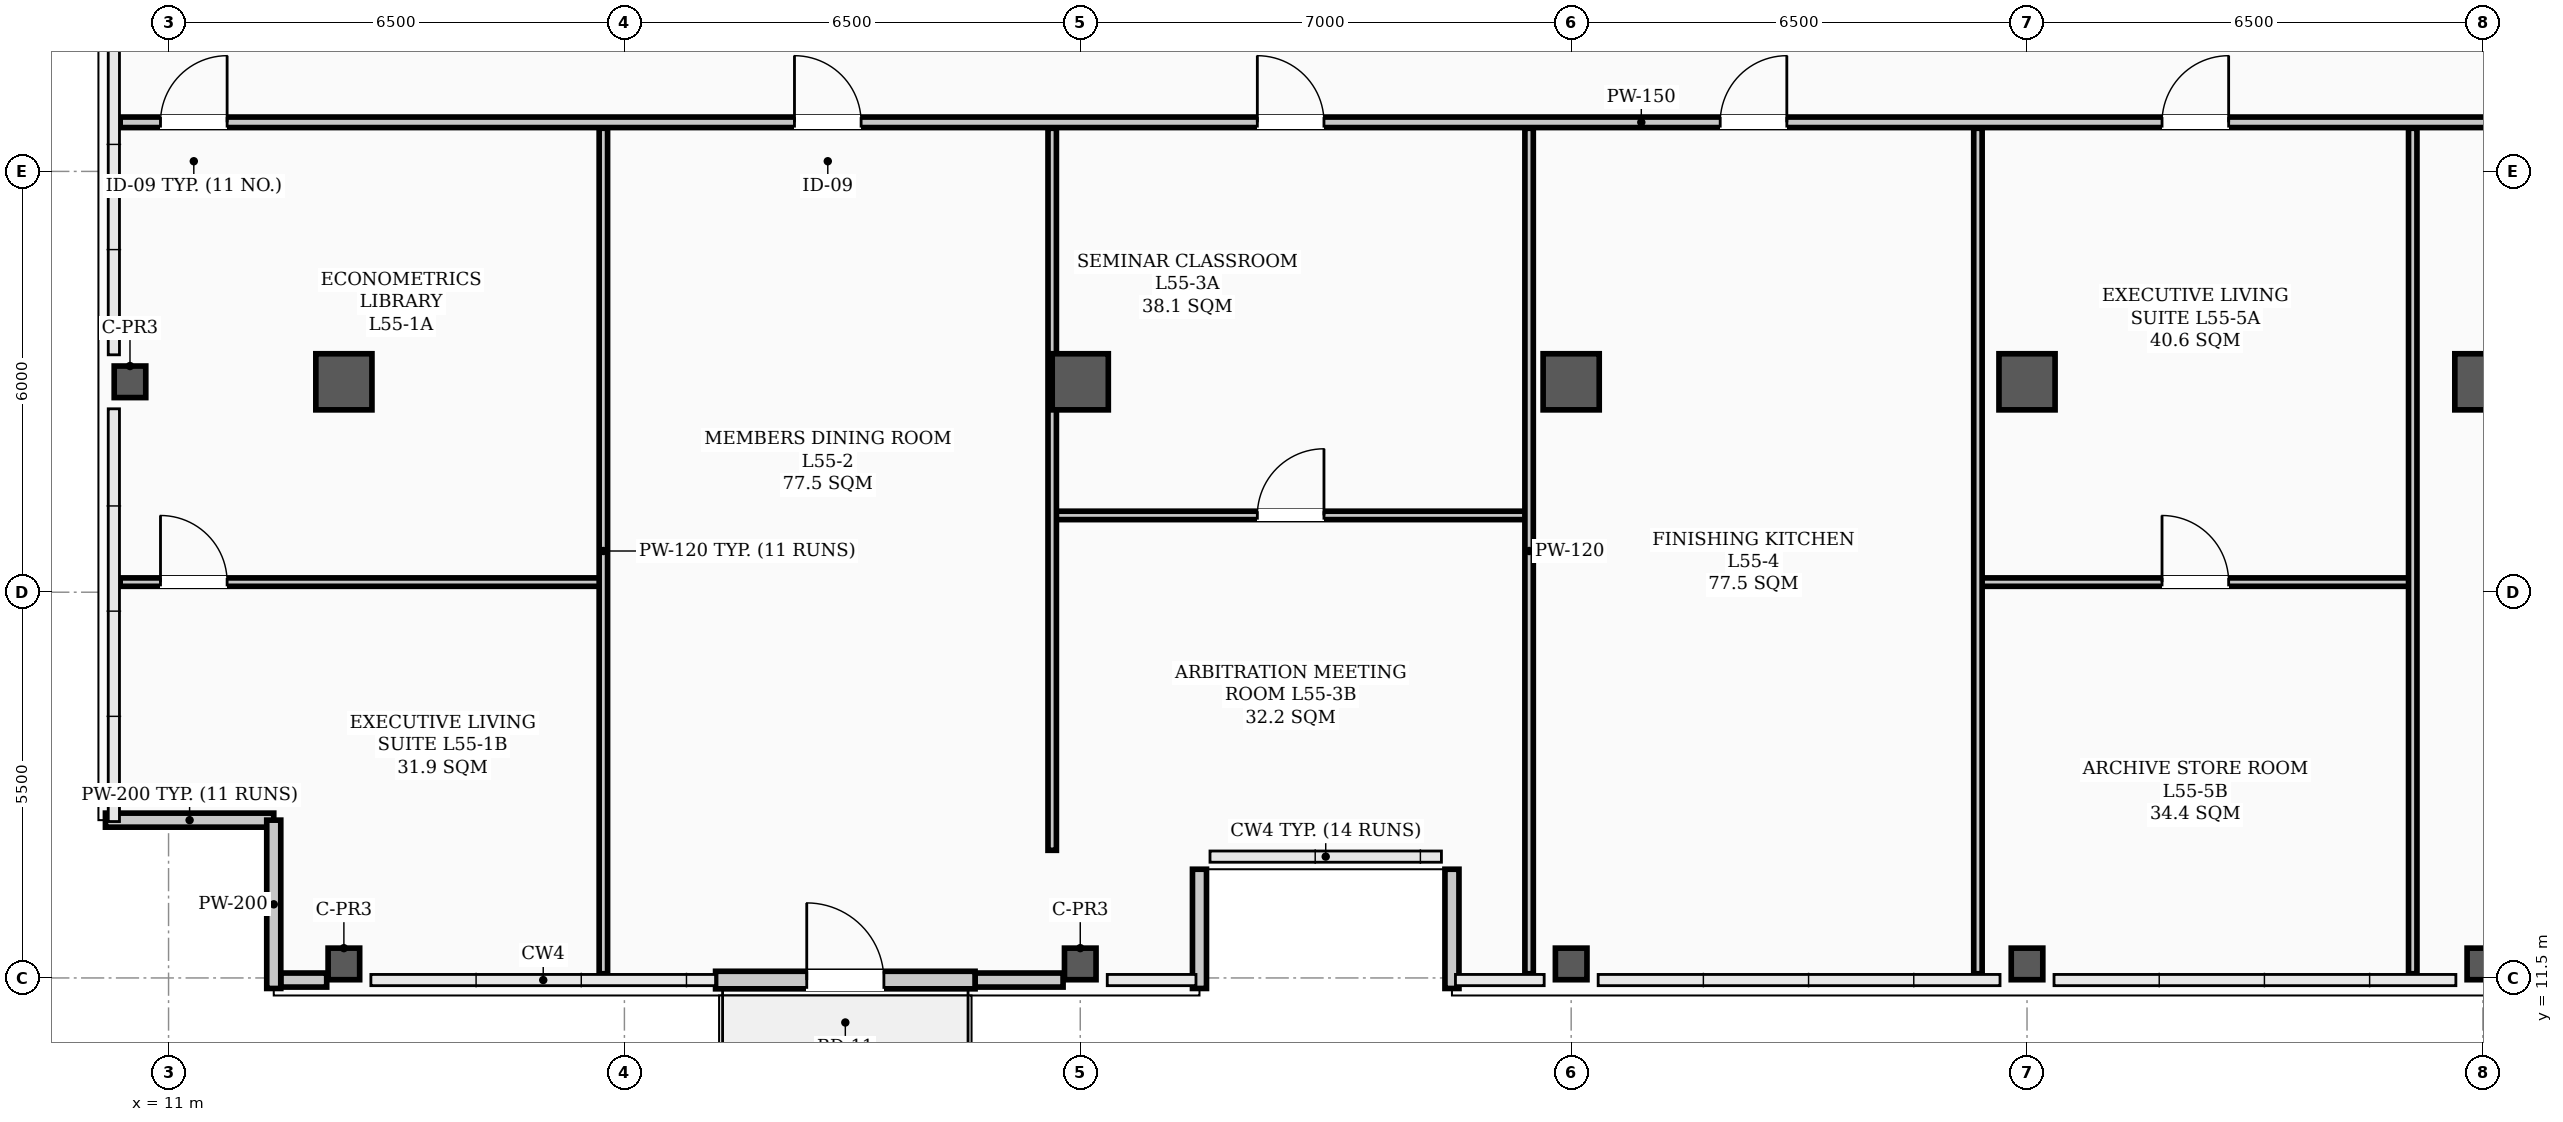
"""IFC4 building model, lengths in metres.
Left out: names, types, materials, properties, quantities, classifications, styles, units other than length and angle.
Written with IfcOpenShell. Run it as: python <this file> out.ifc"""

import sys

from ifc_helpers import new_model, si_unit, direction, frame, frame_2d, origin, origin_2d, place, context, subcontext, project, spatial, rectangle, hollow_rectangle, extrude, element, fill, save


model = new_model("IFC4")
c1 = context("Model", 3, precision=1e-05, world=origin(), true_north=direction((0.0, 1.0)))
c2 = subcontext(c1, "Body", "Model", "MODEL_VIEW")
j1 = project(units=[si_unit("LENGTHUNIT", "METRE"), si_unit("PLANEANGLEUNIT", "RADIAN")], contexts=[c1])
p1 = place(None, origin())
s1 = spatial("IfcSite", under=j1, at=p1, CompositionType="ELEMENT")
p2 = place(p1, origin())
s2 = spatial("IfcBuilding", under=s1, at=p2, CompositionType="ELEMENT")
p3 = place(p2, frame((0.0, 0.0, 222.8)))
s3 = spatial("IfcBuildingStorey", under=s2, at=p3, CompositionType="ELEMENT", Elevation=222.8)
for number, where, z_axis, x_axis in (
    (1, (13.5, 20.0, 0.0), (0.0, 0.0, 1.0), (1.0, 0.0, 0.0)),
    (2, (24.0, 20.0, 0.0), (0.0, 0.0, 1.0), (1.0, 0.0, 0.0)),
    (3, (31.0, 20.0, 0.0), (0.0, 0.0, 1.0), (1.0, 0.0, 0.0)),
    (4, (37.5, 20.0, 0.0), (0.0, 0.0, 1.0), (1.0, 0.0, 0.0)),
    (5, (44.0, 20.0, 0.0), (0.0, 0.0, 1.0), (1.0, 0.0, 0.0)),
):
    element("IfcColumn", number, at=place(p3, frame(where, z_axis=z_axis, x_axis=x_axis)), inside=s3, PredefinedType="COLUMN", context=c2, shape_type="SweptSolid", body=[
        extrude(hollow_rectangle(XDim=0.8, YDim=0.8, WallThickness=0.032, InnerFilletRadius=0.016, OuterFilletRadius=0.048, at=origin_2d()), origin(), (0.0, 0.0, 1.0), 3.9),
    ])
for number, where, z_axis, x_axis in (
    (6, (10.45, 20.0, 0.0), (0.0, 0.0, 1.0), (1.0, 0.0, 0.0)),
    (7, (13.5, 11.7, 0.0), (0.0, 0.0, 1.0), (1.0, 0.0, 0.0)),
    (8, (24.0, 11.7, 0.0), (0.0, 0.0, 1.0), (1.0, 0.0, 0.0)),
    (9, (31.0, 11.7, 0.0), (0.0, 0.0, 1.0), (1.0, 0.0, 0.0)),
    (10, (37.5, 11.7, 0.0), (0.0, 0.0, 1.0), (1.0, 0.0, 0.0)),
    (11, (44.0, 11.7, 0.0), (0.0, 0.0, 1.0), (1.0, 0.0, 0.0)),
):
    element("IfcColumn", number, at=place(p3, frame(where, z_axis=z_axis, x_axis=x_axis)), inside=s3, PredefinedType="COLUMN", context=c2, shape_type="SweptSolid", body=[
        extrude(hollow_rectangle(XDim=0.45, YDim=0.45, WallThickness=0.022, InnerFilletRadius=0.022, OuterFilletRadius=0.044, at=origin_2d()), origin(), (0.0, 0.0, 1.0), 3.9),
    ])
p4 = place(p3, frame((12.6, 11.47, 0.0), z_axis=(0.0, 0.0, 1.0), x_axis=(1.0, 0.0, 0.0)))
e12 = element("IfcWall", 12, at=p4, inside=s3, PredefinedType="PARAPET", context=c2, shape_type="SweptSolid", body=[
    extrude(rectangle(XDim=0.655, YDim=0.2, at=frame_2d((0.327, 0.0))), origin(), (0.0, 0.0, 1.0), 1.2),
])
p5 = place(p3, frame((22.5, 11.47, 0.0), z_axis=(0.0, 0.0, 1.0), x_axis=(1.0, 0.0, 0.0)))
e13 = element("IfcWall", 13, at=p5, inside=s3, PredefinedType="PARAPET", context=c2, shape_type="SweptSolid", body=[
    extrude(rectangle(XDim=1.255, YDim=0.2, at=frame_2d((0.627, 0.0))), origin(), (0.0, 0.0, 1.0), 1.2),
])
for number, where, z_axis, x_axis in (
    (14, (10.1, 13.75, 0.0), (0.0, 0.0, 1.0), (1.0, 0.0, 0.0)),
    (15, (12.5, 13.75, 0.0), (0.0, 0.0, 1.0), (0.0, -1.0, 0.0)),
):
    element("IfcWall", number, at=place(p3, frame(where, z_axis=z_axis, x_axis=x_axis)), inside=s3, PredefinedType="PARAPET", context=c2, shape_type="SweptSolid", body=[
        extrude(rectangle(XDim=2.4, YDim=0.2, at=frame_2d((1.2, 0.0))), origin(), (0.0, 0.0, 1.0), 1.2),
    ])
for number, where, z_axis, x_axis in (
    (16, (25.7, 11.35, 0.0), (0.0, 0.0, 1.0), (0.0, 1.0, 0.0)),
    (17, (29.3, 13.05, 0.0), (0.0, 0.0, 1.0), (0.0, -1.0, 0.0)),
):
    element("IfcWall", number, at=place(p3, frame(where, z_axis=z_axis, x_axis=x_axis)), inside=s3, PredefinedType="PARAPET", context=c2, shape_type="SweptSolid", body=[
        extrude(rectangle(XDim=1.7, YDim=0.2, at=frame_2d((0.85, 0.0))), origin(), (0.0, 0.0, 1.0), 1.2),
    ])
p6 = place(p3, frame((18.8, 11.47, 0.0), z_axis=(0.0, 0.0, 1.0), x_axis=(1.0, 0.0, 0.0)))
e18 = element("IfcWall", 18, at=p6, inside=s3, PredefinedType="STANDARD", context=c2, shape_type="SweptSolid", body=[
    extrude(rectangle(XDim=3.7, YDim=0.25, at=frame_2d((1.85, 0.0))), origin(), (0.0, 0.0, 1.0), 3.18),
])
p7 = place(p6, frame((1.3, 0.0, 0.0)))
e19 = element("IfcOpeningElement", 19, at=p7, cuts=e18, PredefinedType="OPENING", context=c2, shape_type="SweptSolid", body=[
    extrude(rectangle(XDim=1.1, YDim=2.2, at=frame_2d((0.55, 1.1))), frame((0.0, 0.135, 0.0), z_axis=(0.0, -1.0, 0.0), x_axis=(1.0, 0.0, 0.0)), (0.0, 0.0, 1.0), 0.27),
])
p8 = place(p3, frame((10.31, 23.7, 0.0), z_axis=(0.0, 0.0, 1.0), x_axis=(1.0, 0.0, 0.0)))
e20 = element("IfcWall", 20, at=p8, inside=s3, PredefinedType="PARTITIONING", context=c2, shape_type="SweptSolid", body=[
    extrude(rectangle(XDim=43.38, YDim=0.15, at=frame_2d((21.69, 0.0))), origin(), (0.0, 0.0, 1.0), 3.2),
])
p9 = place(p8, frame((0.575, 0.0, 0.0)))
e21 = element("IfcOpeningElement", 21, at=p9, cuts=e20, PredefinedType="OPENING", context=c2, shape_type="SweptSolid", body=[
    extrude(rectangle(XDim=0.95, YDim=2.08, at=frame_2d((0.475, 1.04))), frame((0.0, 0.085, 0.0), z_axis=(0.0, -1.0, 0.0), x_axis=(1.0, 0.0, 0.0)), (0.0, 0.0, 1.0), 0.17),
])
p10 = place(p8, frame((9.615, 0.0, 0.0)))
e22 = element("IfcOpeningElement", 22, at=p10, cuts=e20, PredefinedType="OPENING", context=c2, shape_type="SweptSolid", body=[
    extrude(rectangle(XDim=0.95, YDim=2.08, at=frame_2d((0.475, 1.04))), frame((0.0, 0.085, 0.0), z_axis=(0.0, -1.0, 0.0), x_axis=(1.0, 0.0, 0.0)), (0.0, 0.0, 1.0), 0.17),
])
p11 = place(p8, frame((16.215, 0.0, 0.0)))
e23 = element("IfcOpeningElement", 23, at=p11, cuts=e20, PredefinedType="OPENING", context=c2, shape_type="SweptSolid", body=[
    extrude(rectangle(XDim=0.95, YDim=2.08, at=frame_2d((0.475, 1.04))), frame((0.0, 0.085, 0.0), z_axis=(0.0, -1.0, 0.0), x_axis=(1.0, 0.0, 0.0)), (0.0, 0.0, 1.0), 0.17),
])
p12 = place(p8, frame((22.815, 0.0, 0.0)))
e24 = element("IfcOpeningElement", 24, at=p12, cuts=e20, PredefinedType="OPENING", context=c2, shape_type="SweptSolid", body=[
    extrude(rectangle(XDim=0.95, YDim=2.08, at=frame_2d((0.475, 1.04))), frame((0.0, 0.085, 0.0), z_axis=(0.0, -1.0, 0.0), x_axis=(1.0, 0.0, 0.0)), (0.0, 0.0, 1.0), 0.17),
])
p13 = place(p8, frame((29.115, 0.0, 0.0)))
e25 = element("IfcOpeningElement", 25, at=p13, cuts=e20, PredefinedType="OPENING", context=c2, shape_type="SweptSolid", body=[
    extrude(rectangle(XDim=0.95, YDim=2.08, at=frame_2d((0.475, 1.04))), frame((0.0, 0.085, 0.0), z_axis=(0.0, -1.0, 0.0), x_axis=(1.0, 0.0, 0.0)), (0.0, 0.0, 1.0), 0.17),
])
p14 = place(p8, frame((35.315, 0.0, 0.0)))
e26 = element("IfcOpeningElement", 26, at=p14, cuts=e20, PredefinedType="OPENING", context=c2, shape_type="SweptSolid", body=[
    extrude(rectangle(XDim=0.95, YDim=2.08, at=frame_2d((0.475, 1.04))), frame((0.0, 0.085, 0.0), z_axis=(0.0, -1.0, 0.0), x_axis=(1.0, 0.0, 0.0)), (0.0, 0.0, 1.0), 0.17),
])
p15 = place(p3, frame((10.31, 17.144, 0.0), z_axis=(0.0, 0.0, 1.0), x_axis=(1.0, 0.0, 0.0)))
e27 = element("IfcWall", 27, at=p15, inside=s3, PredefinedType="PARTITIONING", context=c2, shape_type="SweptSolid", body=[
    extrude(rectangle(XDim=6.89, YDim=0.12, at=frame_2d((3.445, 0.0))), origin(), (0.0, 0.0, 1.0), 3.2),
])
p16 = place(p15, frame((0.575, 0.0, 0.0)))
e28 = element("IfcOpeningElement", 28, at=p16, cuts=e27, PredefinedType="OPENING", context=c2, shape_type="SweptSolid", body=[
    extrude(rectangle(XDim=0.95, YDim=2.08, at=frame_2d((0.475, 1.04))), frame((0.0, 0.07, 0.0), z_axis=(0.0, -1.0, 0.0), x_axis=(1.0, 0.0, 0.0)), (0.0, 0.0, 1.0), 0.14),
])
p17 = place(p3, frame((23.6, 18.095, 0.0), z_axis=(0.0, 0.0, 1.0), x_axis=(1.0, 0.0, 0.0)))
e29 = element("IfcWall", 29, at=p17, inside=s3, PredefinedType="PARTITIONING", context=c2, shape_type="SweptSolid", body=[
    extrude(rectangle(XDim=6.8, YDim=0.12, at=frame_2d((3.4, 0.0))), origin(), (0.0, 0.0, 1.0), 3.2),
])
p18 = place(p17, frame((2.925, 0.0, 0.0)))
e30 = element("IfcOpeningElement", 30, at=p18, cuts=e29, PredefinedType="OPENING", context=c2, shape_type="SweptSolid", body=[
    extrude(rectangle(XDim=0.95, YDim=2.08, at=frame_2d((0.475, 1.04))), frame((0.0, 0.07, 0.0), z_axis=(0.0, -1.0, 0.0), x_axis=(1.0, 0.0, 0.0)), (0.0, 0.0, 1.0), 0.14),
])
p19 = place(p3, frame((36.8, 17.144, 0.0), z_axis=(0.0, 0.0, 1.0), x_axis=(1.0, 0.0, 0.0)))
e31 = element("IfcWall", 31, at=p19, inside=s3, PredefinedType="PARTITIONING", context=c2, shape_type="SweptSolid", body=[
    extrude(rectangle(XDim=6.2, YDim=0.12, at=frame_2d((3.1, 0.0))), origin(), (0.0, 0.0, 1.0), 3.2),
])
p20 = place(p19, frame((2.625, 0.0, 0.0)))
e32 = element("IfcOpeningElement", 32, at=p20, cuts=e31, PredefinedType="OPENING", context=c2, shape_type="SweptSolid", body=[
    extrude(rectangle(XDim=0.95, YDim=2.08, at=frame_2d((0.475, 1.04))), frame((0.0, 0.07, 0.0), z_axis=(0.0, -1.0, 0.0), x_axis=(1.0, 0.0, 0.0)), (0.0, 0.0, 1.0), 0.14),
])
p21 = place(p3, frame((17.2, 11.56, 0.0), z_axis=(0.0, 0.0, 1.0), x_axis=(0.0, 1.0, 0.0)))
e33 = element("IfcWall", 33, at=p21, inside=s3, PredefinedType="PARTITIONING", context=c2, shape_type="SweptSolid", body=[
    extrude(rectangle(XDim=12.055, YDim=0.12, at=frame_2d((6.027, 0.0))), origin(), (0.0, 0.0, 1.0), 3.1),
])
p22 = place(p3, frame((23.6, 13.32, 0.0), z_axis=(0.0, 0.0, 1.0), x_axis=(0.0, 1.0, 0.0)))
e34 = element("IfcWall", 34, at=p22, inside=s3, PredefinedType="PARTITIONING", context=c2, shape_type="SweptSolid", body=[
    extrude(rectangle(XDim=10.295, YDim=0.12, at=frame_2d((5.147, 0.0))), origin(), (0.0, 0.0, 1.0), 3.1),
])
for number, where, z_axis, x_axis in (
    (35, (30.4, 11.56, 0.0), (0.0, 0.0, 1.0), (0.0, 1.0, 0.0)),
    (36, (36.8, 11.56, 0.0), (0.0, 0.0, 1.0), (0.0, 1.0, 0.0)),
    (37, (43.0, 11.56, 0.0), (0.0, 0.0, 1.0), (0.0, 1.0, 0.0)),
):
    element("IfcWall", number, at=place(p3, frame(where, z_axis=z_axis, x_axis=x_axis)), inside=s3, PredefinedType="PARTITIONING", context=c2, shape_type="SweptSolid", body=[
        extrude(rectangle(XDim=12.055, YDim=0.12, at=frame_2d((6.027, 0.0))), origin(), (0.0, 0.0, 1.0), 3.1),
    ])
p23 = place(p7, origin())
e38 = element("IfcDoor", 38, at=p23, inside=s3, OperationType="SINGLE_SWING_LEFT", PredefinedType="DOOR", context=c2, shape_type="SweptSolid", body=[
    extrude(rectangle(XDim=1.1, YDim=2.2, at=frame_2d((0.55, 1.1))), frame((0.0, 0.025, 0.0), z_axis=(0.0, -1.0, 0.0), x_axis=(1.0, 0.0, 0.0)), (0.0, 0.0, 1.0), 0.05),
])
fill(e19, e38)
p24 = place(p16, origin())
e39 = element("IfcDoor", 39, at=p24, inside=s3, OperationType="SINGLE_SWING_LEFT", PredefinedType="DOOR", context=c2, shape_type="SweptSolid", body=[
    extrude(rectangle(XDim=0.95, YDim=2.08, at=frame_2d((0.475, 1.04))), frame((0.0, 0.025, 0.0), z_axis=(0.0, -1.0, 0.0), x_axis=(1.0, 0.0, 0.0)), (0.0, 0.0, 1.0), 0.05),
])
fill(e28, e39)
p25 = place(p9, origin())
e40 = element("IfcDoor", 40, at=p25, inside=s3, OperationType="SINGLE_SWING_RIGHT", PredefinedType="DOOR", context=c2, shape_type="SweptSolid", body=[
    extrude(rectangle(XDim=0.95, YDim=2.08, at=frame_2d((0.475, 1.04))), frame((0.0, 0.025, 0.0), z_axis=(0.0, -1.0, 0.0), x_axis=(1.0, 0.0, 0.0)), (0.0, 0.0, 1.0), 0.05),
])
fill(e21, e40)
p26 = place(p10, origin())
e41 = element("IfcDoor", 41, at=p26, inside=s3, OperationType="SINGLE_SWING_LEFT", PredefinedType="DOOR", context=c2, shape_type="SweptSolid", body=[
    extrude(rectangle(XDim=0.95, YDim=2.08, at=frame_2d((0.475, 1.04))), frame((0.0, 0.025, 0.0), z_axis=(0.0, -1.0, 0.0), x_axis=(1.0, 0.0, 0.0)), (0.0, 0.0, 1.0), 0.05),
])
fill(e22, e41)
p27 = place(p18, origin())
e42 = element("IfcDoor", 42, at=p27, inside=s3, OperationType="SINGLE_SWING_RIGHT", PredefinedType="DOOR", context=c2, shape_type="SweptSolid", body=[
    extrude(rectangle(XDim=0.95, YDim=2.08, at=frame_2d((0.475, 1.04))), frame((0.0, 0.025, 0.0), z_axis=(0.0, -1.0, 0.0), x_axis=(1.0, 0.0, 0.0)), (0.0, 0.0, 1.0), 0.05),
])
fill(e30, e42)
p28 = place(p11, origin())
e43 = element("IfcDoor", 43, at=p28, inside=s3, OperationType="SINGLE_SWING_LEFT", PredefinedType="DOOR", context=c2, shape_type="SweptSolid", body=[
    extrude(rectangle(XDim=0.95, YDim=2.08, at=frame_2d((0.475, 1.04))), frame((0.0, 0.025, 0.0), z_axis=(0.0, -1.0, 0.0), x_axis=(1.0, 0.0, 0.0)), (0.0, 0.0, 1.0), 0.05),
])
fill(e23, e43)
p29 = place(p12, origin())
e44 = element("IfcDoor", 44, at=p29, inside=s3, OperationType="SINGLE_SWING_RIGHT", PredefinedType="DOOR", context=c2, shape_type="SweptSolid", body=[
    extrude(rectangle(XDim=0.95, YDim=2.08, at=frame_2d((0.475, 1.04))), frame((0.0, 0.025, 0.0), z_axis=(0.0, -1.0, 0.0), x_axis=(1.0, 0.0, 0.0)), (0.0, 0.0, 1.0), 0.05),
])
fill(e24, e44)
p30 = place(p20, origin())
e45 = element("IfcDoor", 45, at=p30, inside=s3, OperationType="SINGLE_SWING_LEFT", PredefinedType="DOOR", context=c2, shape_type="SweptSolid", body=[
    extrude(rectangle(XDim=0.95, YDim=2.08, at=frame_2d((0.475, 1.04))), frame((0.0, 0.025, 0.0), z_axis=(0.0, -1.0, 0.0), x_axis=(1.0, 0.0, 0.0)), (0.0, 0.0, 1.0), 0.05),
])
fill(e32, e45)
p31 = place(p13, origin())
e46 = element("IfcDoor", 46, at=p31, inside=s3, OperationType="SINGLE_SWING_RIGHT", PredefinedType="DOOR", context=c2, shape_type="SweptSolid", body=[
    extrude(rectangle(XDim=0.95, YDim=2.08, at=frame_2d((0.475, 1.04))), frame((0.0, 0.025, 0.0), z_axis=(0.0, -1.0, 0.0), x_axis=(1.0, 0.0, 0.0)), (0.0, 0.0, 1.0), 0.05),
])
fill(e25, e46)
save(model, sys.argv[1])
